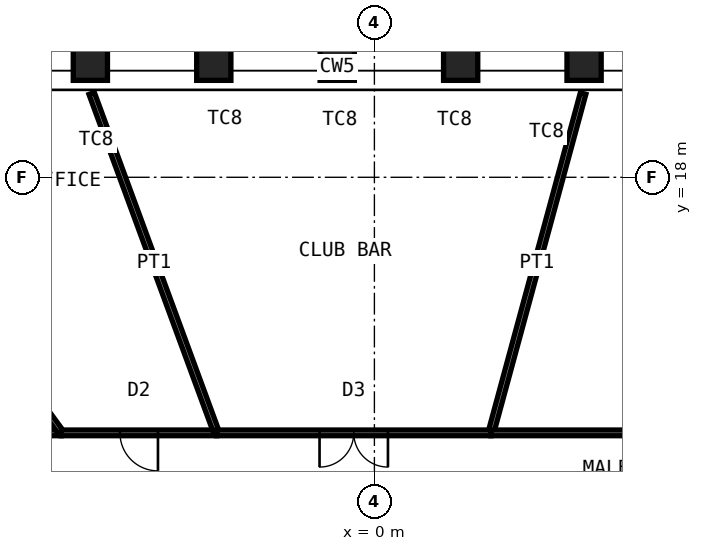
"""IFC4 building model, lengths in metres.
Left out: names, types, materials, properties, quantities, classifications, styles, units other than length and angle.
Written with IfcOpenShell. Run it as: python <this file> out.ifc"""

import sys

from ifc_helpers import new_model, si_unit, direction, frame, frame_2d, origin, origin_2d, place, context, subcontext, project, spatial, rectangle, hollow_rectangle, extrude, element, fill, save


model = new_model("IFC4")
c1 = context("Model", 3, precision=1e-05, world=origin(), true_north=direction((0.0, 1.0)))
c2 = subcontext(c1, "Body", "Model", "MODEL_VIEW")
j1 = project(units=[si_unit("LENGTHUNIT", "METRE"), si_unit("PLANEANGLEUNIT", "RADIAN")], contexts=[c1])
p1 = place(None, origin())
s1 = spatial("IfcSite", under=j1, at=p1, CompositionType="ELEMENT")
p2 = place(p1, origin())
s2 = spatial("IfcBuilding", under=s1, at=p2, CompositionType="ELEMENT")
p3 = place(p2, frame((0.0, 0.0, 320.8)))
s3 = spatial("IfcBuildingStorey", under=s2, at=p3, CompositionType="ELEMENT", Elevation=320.8)
for number, where, z_axis, x_axis in (
    (1, (-7.474, 21.0, 0.0), (0.0, 0.0, 1.0), (-1.0, 0.0, 0.0)),
    (2, (-4.226, 21.0, 0.0), (0.0, 0.0, 1.0), (-1.0, 0.0, 0.0)),
    (3, (-0.978, 21.0, 0.0), (0.0, 0.0, 1.0), (-1.0, 0.0, 0.0)),
    (4, (2.27, 21.0, 0.0), (0.0, 0.0, 1.0), (-1.0, 0.0, 0.0)),
    (5, (5.518, 21.0, 0.0), (0.0, 0.0, 1.0), (-1.0, 0.0, 0.0)),
):
    element("IfcColumn", number, at=place(p3, frame(where, z_axis=z_axis, x_axis=x_axis)), inside=s3, PredefinedType="COLUMN", context=c2, shape_type="SweptSolid", body=[
        extrude(hollow_rectangle(XDim=0.9, YDim=0.9, WallThickness=0.05, at=origin_2d()), origin(), (0.0, 0.0, 1.0), 4.2),
    ])
p4 = place(p3, frame((5.492, 20.204, 0.0), z_axis=(0.0, 0.0, 1.0), x_axis=(-0.262302393053, -0.964985727666, 0.0)))
e6 = element("IfcWall", 6, at=p4, inside=s3, PredefinedType="PARTITIONING", context=c2, shape_type="SweptSolid", body=[
    extrude(rectangle(XDim=9.253, YDim=0.15, at=frame_2d((4.626, 0.0))), origin(), (0.0, 0.0, 1.0), 3.33),
])
p5 = place(p3, frame((3.065, 11.275, 0.0), z_axis=(0.0, 0.0, 1.0), x_axis=(1.0, 0.0, 0.0)))
e7 = element("IfcWall", 7, at=p5, inside=s3, PredefinedType="PARTITIONING", context=c2, shape_type="SweptSolid", body=[
    extrude(rectangle(XDim=13.31, YDim=0.15, at=frame_2d((6.655, 0.0))), origin(), (0.0, 0.0, 1.0), 4.03),
])
p6 = place(p5, frame((5.755, 0.0, 0.0)))
e8 = element("IfcOpeningElement", 8, at=p6, cuts=e7, PredefinedType="OPENING", context=c2, shape_type="SweptSolid", body=[
    extrude(rectangle(XDim=1.8, YDim=2.4, at=frame_2d((0.9, 1.2))), frame((0.0, 0.085, 0.0), z_axis=(0.0, -1.0, 0.0), x_axis=(1.0, 0.0, 0.0)), (0.0, 0.0, 1.0), 0.17),
])
p7 = place(p3, frame((-10.807, 11.275, 0.0), z_axis=(0.0, 0.0, 1.0), x_axis=(1.0, 0.0, 0.0)))
e9 = element("IfcWall", 9, at=p7, inside=s3, PredefinedType="PARTITIONING", context=c2, shape_type="SweptSolid", body=[
    extrude(rectangle(XDim=2.568, YDim=0.15, at=frame_2d((1.284, 0.0))), origin(), (0.0, 0.0, 1.0), 4.03),
])
p8 = place(p7, frame((0.784, 0.0, 0.0)))
e10 = element("IfcOpeningElement", 10, at=p8, cuts=e9, PredefinedType="OPENING", context=c2, shape_type="SweptSolid", body=[
    extrude(rectangle(XDim=1.0, YDim=2.4, at=frame_2d((0.5, 1.2))), frame((0.0, 0.085, 0.0), z_axis=(0.0, -1.0, 0.0), x_axis=(1.0, 0.0, 0.0)), (0.0, 0.0, 1.0), 0.17),
])
p9 = place(p3, frame((-13.486, 18.455, 0.0), z_axis=(0.0, 0.0, 1.0), x_axis=(0.589986991866, -0.80741275035, 0.0)))
e11 = element("IfcWall", 11, at=p9, inside=s3, PredefinedType="PARTITIONING", context=c2, shape_type="SweptSolid", body=[
    extrude(rectangle(XDim=8.893, YDim=0.15, at=frame_2d((4.447, 0.0))), origin(), (0.0, 0.0, 1.0), 2.93),
])
p10 = place(p3, frame((-8.239, 11.275, 0.0), z_axis=(0.0, 0.0, 1.0), x_axis=(1.0, 0.0, 0.0)))
e12 = element("IfcWall", 12, at=p10, inside=s3, PredefinedType="PARTITIONING", context=c2, shape_type="SweptSolid", body=[
    extrude(rectangle(XDim=4.088, YDim=0.15, at=frame_2d((2.044, 0.0))), origin(), (0.0, 0.0, 1.0), 4.03),
])
p11 = place(p10, frame((1.544, 0.0, 0.0)))
e13 = element("IfcOpeningElement", 13, at=p11, cuts=e12, PredefinedType="OPENING", context=c2, shape_type="SweptSolid", body=[
    extrude(rectangle(XDim=1.0, YDim=2.4, at=frame_2d((0.5, 1.2))), frame((0.0, 0.085, 0.0), z_axis=(0.0, -1.0, 0.0), x_axis=(1.0, 0.0, 0.0)), (0.0, 0.0, 1.0), 0.17),
])
p12 = place(p3, frame((-7.44, 20.206, 0.0), z_axis=(0.0, 0.0, 1.0), x_axis=(0.345511582319, -0.93841448544, 0.0)))
e14 = element("IfcWall", 14, at=p12, inside=s3, PredefinedType="PARTITIONING", context=c2, shape_type="SweptSolid", body=[
    extrude(rectangle(XDim=9.517, YDim=0.15, at=frame_2d((4.759, 0.0))), origin(), (0.0, 0.0, 1.0), 3.33),
])
p13 = place(p3, frame((-4.151, 11.275, 0.0), z_axis=(0.0, 0.0, 1.0), x_axis=(1.0, 0.0, 0.0)))
e15 = element("IfcWall", 15, at=p13, inside=s3, PredefinedType="PARTITIONING", context=c2, shape_type="SweptSolid", body=[
    extrude(rectangle(XDim=7.216, YDim=0.15, at=frame_2d((3.608, 0.0))), origin(), (0.0, 0.0, 1.0), 4.03),
])
p14 = place(p13, frame((2.708, 0.0, 0.0)))
e16 = element("IfcOpeningElement", 16, at=p14, cuts=e15, PredefinedType="OPENING", context=c2, shape_type="SweptSolid", body=[
    extrude(rectangle(XDim=1.8, YDim=2.4, at=frame_2d((0.9, 1.2))), frame((0.0, 0.085, 0.0), z_axis=(0.0, -1.0, 0.0), x_axis=(1.0, 0.0, 0.0)), (0.0, 0.0, 1.0), 0.17),
])
p15 = place(p11, origin())
e17 = element("IfcDoor", 17, at=p15, inside=s3, OperationType="SINGLE_SWING_RIGHT", PredefinedType="DOOR", context=c2, shape_type="SweptSolid", body=[
    extrude(rectangle(XDim=1.0, YDim=2.4, at=frame_2d((0.5, 1.2))), frame((0.0, 0.025, 0.0), z_axis=(0.0, -1.0, 0.0), x_axis=(1.0, 0.0, 0.0)), (0.0, 0.0, 1.0), 0.05),
])
fill(e13, e17)
p16 = place(p14, origin())
e18 = element("IfcDoor", 18, at=p16, inside=s3, OperationType="DOUBLE_DOOR_DOUBLE_SWING", PredefinedType="DOOR", context=c2, shape_type="SweptSolid", body=[
    extrude(rectangle(XDim=1.8, YDim=2.4, at=frame_2d((0.9, 1.2))), frame((0.0, 0.025, 0.0), z_axis=(0.0, -1.0, 0.0), x_axis=(1.0, 0.0, 0.0)), (0.0, 0.0, 1.0), 0.05),
])
fill(e16, e18)
save(model, sys.argv[1])
